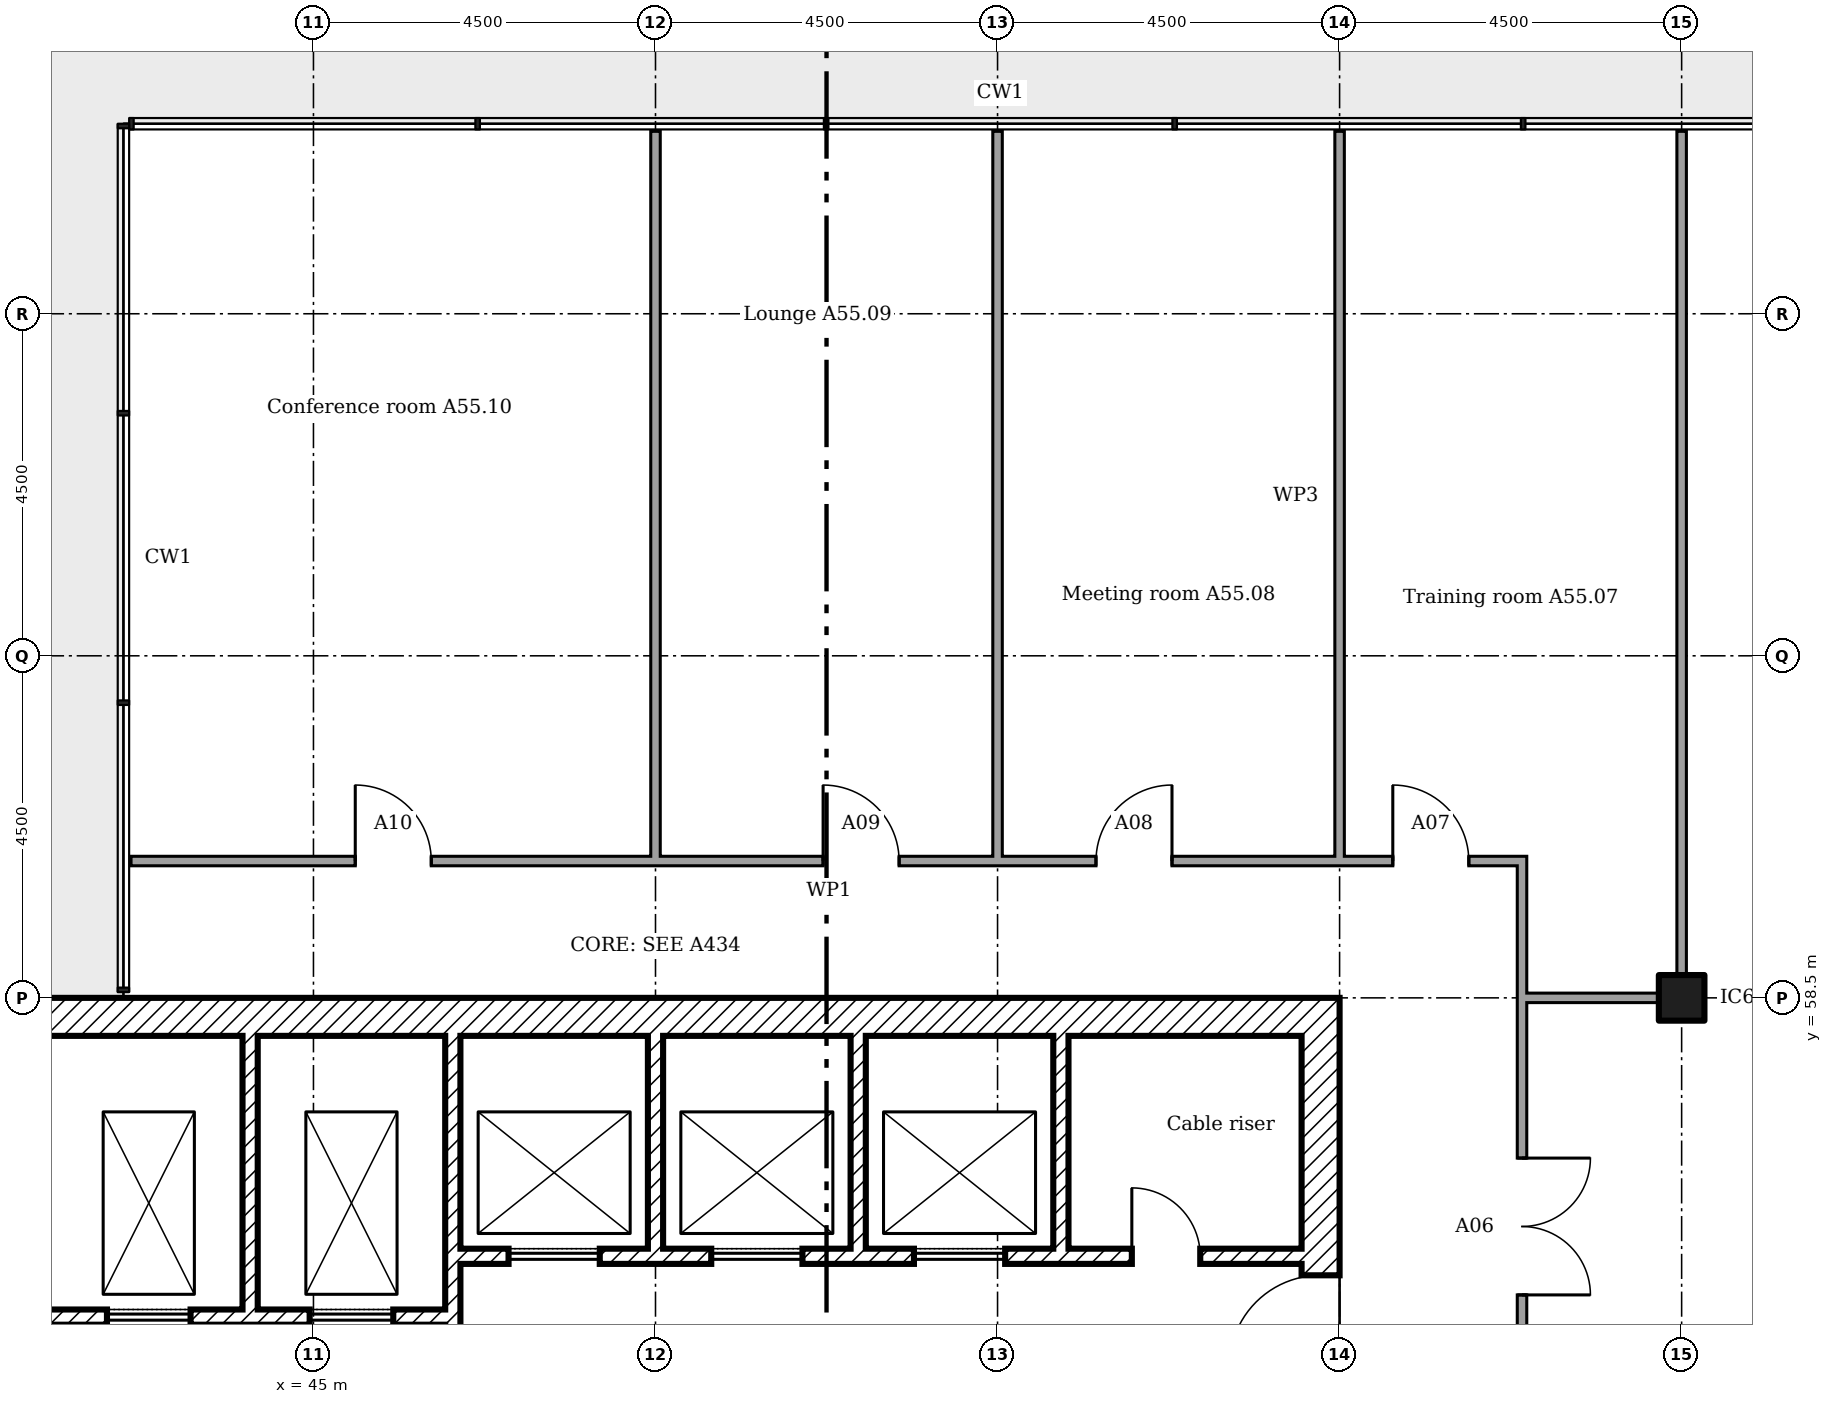
"""IFC4 building model, lengths in metres.
Left out: names, types, materials, properties, quantities, classifications, styles, units other than length and angle.
Written with IfcOpenShell. Run it as: python <this file> out.ifc"""

import sys

from ifc_helpers import new_model, si_unit, direction, frame, frame_2d, origin, origin_2d, place, context, subcontext, project, spatial, rectangle, extrude, element, fill, save


model = new_model("IFC4")
c1 = context("Model", 3, precision=1e-05, world=origin(), true_north=direction((0.0, 1.0)))
c2 = subcontext(c1, "Body", "Model", "MODEL_VIEW")
j1 = project(units=[si_unit("LENGTHUNIT", "METRE"), si_unit("PLANEANGLEUNIT", "RADIAN")], contexts=[c1])
p1 = place(None, origin())
s1 = spatial("IfcSite", under=j1, at=p1, CompositionType="ELEMENT")
p2 = place(p1, origin())
s2 = spatial("IfcBuilding", under=s1, at=p2, CompositionType="ELEMENT")
p3 = place(p2, frame((0.0, 0.0, 217.2)))
s3 = spatial("IfcBuildingStorey", under=s2, at=p3, CompositionType="ELEMENT", Elevation=217.2)
p4 = place(p3, frame((63.0, 58.5, 0.0)))
e1 = element("IfcColumn", 1, at=p4, inside=s3, PredefinedType="COLUMN", context=c2, shape_type="SweptSolid", body=[
    extrude(rectangle(XDim=0.6, YDim=0.6, at=origin_2d()), origin(), (0.0, 0.0, 1.0), 3.6),
])
p5 = place(p3, frame((58.25, 40.5, 0.0), z_axis=(0.0, 0.0, 1.0), x_axis=(0.0, 1.0, 0.0)))
e2 = element("IfcWall", 2, at=p5, inside=s3, PredefinedType="SHEAR", context=c2, shape_type="SweptSolid", body=[
    extrude(rectangle(XDim=18.0, YDim=0.5, at=frame_2d((9.0, 0.0))), origin(), (0.0, 0.0, 1.0), 3.35),
])
p6 = place(p5, frame((13.15, 0.0, 0.0)))
e3 = element("IfcOpeningElement", 3, at=p6, cuts=e2, PredefinedType="OPENING", context=c2, shape_type="SweptSolid", body=[
    extrude(rectangle(XDim=1.2, YDim=2.1, at=frame_2d((0.6, 1.05))), frame((0.0, 0.26, 0.0), z_axis=(0.0, -1.0, 0.0), x_axis=(1.0, 0.0, 0.0)), (0.0, 0.0, 1.0), 0.52),
])
p7 = place(p5, frame((3.9, 0.0, 0.0)))
e4 = element("IfcOpeningElement", 4, at=p7, cuts=e2, PredefinedType="OPENING", context=c2, shape_type="SweptSolid", body=[
    extrude(rectangle(XDim=1.8, YDim=2.1, at=frame_2d((0.9, 1.05))), frame((0.0, 0.26, 0.0), z_axis=(0.0, -1.0, 0.0), x_axis=(1.0, 0.0, 0.0)), (0.0, 0.0, 1.0), 0.52),
])
p8 = place(p5, frame((11.525, 0.0, 0.0)))
e5 = element("IfcOpeningElement", 5, at=p8, cuts=e2, PredefinedType="OPENING", context=c2, shape_type="SweptSolid", body=[
    extrude(rectangle(XDim=1.0, YDim=2.1, at=frame_2d((0.5, 1.05))), frame((0.0, 0.26, 0.0), z_axis=(0.0, -1.0, 0.0), x_axis=(1.0, 0.0, 0.0)), (0.0, 0.0, 1.0), 0.52),
])
p9 = place(p3, frame((40.5, 58.25, 0.0)))
e6 = element("IfcWall", 6, at=p9, inside=s3, PredefinedType="SHEAR", context=c2, shape_type="SweptSolid", body=[
    extrude(rectangle(XDim=17.5, YDim=0.5, at=frame_2d((8.75, 0.0))), origin(), (0.0, 0.0, 1.0), 3.35),
])
p10 = place(p3, frame((44.167, 58.0, 0.0), z_axis=(0.0, 0.0, 1.0), x_axis=(0.0, -1.0, 0.0)))
e7 = element("IfcWall", 7, at=p10, inside=s3, PredefinedType="SHEAR", context=c2, shape_type="SweptSolid", body=[
    extrude(rectangle(XDim=3.6, YDim=0.2, at=frame_2d((1.8, 0.0))), origin(), (0.0, 0.0, 1.0), 3.35),
])
p11 = place(p3, frame((46.833, 58.0, 0.0), z_axis=(0.0, 0.0, 1.0), x_axis=(0.0, -1.0, 0.0)))
e8 = element("IfcWall", 8, at=p11, inside=s3, PredefinedType="SHEAR", context=c2, shape_type="SweptSolid", body=[
    extrude(rectangle(XDim=4.7, YDim=0.2, at=frame_2d((2.35, 0.0))), origin(), (0.0, 0.0, 1.0), 3.35),
])
for number, where, z_axis, x_axis in (
    (9, (49.5, 58.0, 0.0), (0.0, 0.0, 1.0), (0.0, -1.0, 0.0)),
    (10, (52.167, 58.0, 0.0), (0.0, 0.0, 1.0), (0.0, -1.0, 0.0)),
    (11, (54.833, 58.0, 0.0), (0.0, 0.0, 1.0), (0.0, -1.0, 0.0)),
):
    element("IfcWall", number, at=place(p3, frame(where, z_axis=z_axis, x_axis=x_axis)), inside=s3, PredefinedType="SHEAR", context=c2, shape_type="SweptSolid", body=[
        extrude(rectangle(XDim=2.8, YDim=0.2, at=frame_2d((1.4, 0.0))), origin(), (0.0, 0.0, 1.0), 3.35),
    ])
p12 = place(p3, frame((46.933, 55.1, 0.0)))
e12 = element("IfcWall", 12, at=p12, inside=s3, PredefinedType="SHEAR", context=c2, shape_type="SweptSolid", body=[
    extrude(rectangle(XDim=11.067, YDim=0.2, at=frame_2d((5.533, 0.0))), origin(), (0.0, 0.0, 1.0), 3.35),
])
p13 = place(p12, frame((8.833, 0.0, 0.0)))
e13 = element("IfcOpeningElement", 13, at=p13, cuts=e12, PredefinedType="OPENING", context=c2, shape_type="SweptSolid", body=[
    extrude(rectangle(XDim=0.9, YDim=2.1, at=frame_2d((0.45, 1.05))), frame((0.0, 0.11, 0.0), z_axis=(0.0, -1.0, 0.0), x_axis=(1.0, 0.0, 0.0)), (0.0, 0.0, 1.0), 0.22),
])
p14 = place(p12, frame((0.633, 0.0, 0.0)))
e14 = element("IfcOpeningElement", 14, at=p14, cuts=e12, PredefinedType="OPENING", context=c2, shape_type="SweptSolid", body=[
    extrude(rectangle(XDim=1.2, YDim=2.1, at=frame_2d((0.6, 1.05))), frame((0.0, 0.11, 0.0), z_axis=(0.0, -1.0, 0.0), x_axis=(1.0, 0.0, 0.0)), (0.0, 0.0, 1.0), 0.22),
])
p15 = place(p12, frame((3.3, 0.0, 0.0)))
e15 = element("IfcOpeningElement", 15, at=p15, cuts=e12, PredefinedType="OPENING", context=c2, shape_type="SweptSolid", body=[
    extrude(rectangle(XDim=1.2, YDim=2.1, at=frame_2d((0.6, 1.05))), frame((0.0, 0.11, 0.0), z_axis=(0.0, -1.0, 0.0), x_axis=(1.0, 0.0, 0.0)), (0.0, 0.0, 1.0), 0.22),
])
p16 = place(p12, frame((5.967, 0.0, 0.0)))
e16 = element("IfcOpeningElement", 16, at=p16, cuts=e12, PredefinedType="OPENING", context=c2, shape_type="SweptSolid", body=[
    extrude(rectangle(XDim=1.2, YDim=2.1, at=frame_2d((0.6, 1.05))), frame((0.0, 0.11, 0.0), z_axis=(0.0, -1.0, 0.0), x_axis=(1.0, 0.0, 0.0)), (0.0, 0.0, 1.0), 0.22),
])
p17 = place(p3, frame((41.0, 54.3, 0.0)))
e17 = element("IfcWall", 17, at=p17, inside=s3, PredefinedType="SHEAR", context=c2, shape_type="SweptSolid", body=[
    extrude(rectangle(XDim=5.733, YDim=0.2, at=frame_2d((2.867, 0.0))), origin(), (0.0, 0.0, 1.0), 3.35),
])
p18 = place(p17, frame((1.283, 0.0, 0.0)))
e18 = element("IfcOpeningElement", 18, at=p18, cuts=e17, PredefinedType="OPENING", context=c2, shape_type="SweptSolid", body=[
    extrude(rectangle(XDim=1.1, YDim=2.1, at=frame_2d((0.55, 1.05))), frame((0.0, 0.11, 0.0), z_axis=(0.0, -1.0, 0.0), x_axis=(1.0, 0.0, 0.0)), (0.0, 0.0, 1.0), 0.22),
])
p19 = place(p17, frame((3.95, 0.0, 0.0)))
e19 = element("IfcOpeningElement", 19, at=p19, cuts=e17, PredefinedType="OPENING", context=c2, shape_type="SweptSolid", body=[
    extrude(rectangle(XDim=1.1, YDim=2.1, at=frame_2d((0.55, 1.05))), frame((0.0, 0.11, 0.0), z_axis=(0.0, -1.0, 0.0), x_axis=(1.0, 0.0, 0.0)), (0.0, 0.0, 1.0), 0.22),
])
p20 = place(p3, frame((60.9, 58.5, 0.0)))
e20 = element("IfcWall", 20, at=p20, inside=s3, PredefinedType="PARTITIONING", context=c2, shape_type="SweptSolid", body=[
    extrude(rectangle(XDim=2.163, YDim=0.125, at=frame_2d((1.081, 0.0))), origin(), (0.0, 0.0, 1.0), 2.676),
])
p21 = place(p3, frame((42.6, 60.3, 0.0)))
e21 = element("IfcWall", 21, at=p21, inside=s3, PredefinedType="PARTITIONING", context=c2, shape_type="SweptSolid", body=[
    extrude(rectangle(XDim=18.362, YDim=0.125, at=frame_2d((9.181, 0.0))), origin(), (0.0, 0.0, 1.0), 3.45),
])
p22 = place(p21, frame((16.6, 0.0, 0.0)))
e22 = element("IfcOpeningElement", 22, at=p22, cuts=e21, PredefinedType="OPENING", context=c2, shape_type="SweptSolid", body=[
    extrude(rectangle(XDim=1.0, YDim=2.1, at=frame_2d((0.5, 1.05))), frame((0.0, 0.073, 0.0), z_axis=(0.0, -1.0, 0.0), x_axis=(1.0, 0.0, 0.0)), (0.0, 0.0, 1.0), 0.145),
])
p23 = place(p21, frame((12.695, 0.0, 0.0)))
e23 = element("IfcOpeningElement", 23, at=p23, cuts=e21, PredefinedType="OPENING", context=c2, shape_type="SweptSolid", body=[
    extrude(rectangle(XDim=1.0, YDim=2.1, at=frame_2d((0.5, 1.05))), frame((0.0, 0.073, 0.0), z_axis=(0.0, -1.0, 0.0), x_axis=(1.0, 0.0, 0.0)), (0.0, 0.0, 1.0), 0.145),
])
p24 = place(p21, frame((9.105, 0.0, 0.0)))
e24 = element("IfcOpeningElement", 24, at=p24, cuts=e21, PredefinedType="OPENING", context=c2, shape_type="SweptSolid", body=[
    extrude(rectangle(XDim=1.0, YDim=2.1, at=frame_2d((0.5, 1.05))), frame((0.0, 0.073, 0.0), z_axis=(0.0, -1.0, 0.0), x_axis=(1.0, 0.0, 0.0)), (0.0, 0.0, 1.0), 0.145),
])
p25 = place(p21, frame((2.95, 0.0, 0.0)))
e25 = element("IfcOpeningElement", 25, at=p25, cuts=e21, PredefinedType="OPENING", context=c2, shape_type="SweptSolid", body=[
    extrude(rectangle(XDim=1.0, YDim=2.1, at=frame_2d((0.5, 1.05))), frame((0.0, 0.073, 0.0), z_axis=(0.0, -1.0, 0.0), x_axis=(1.0, 0.0, 0.0)), (0.0, 0.0, 1.0), 0.145),
])
for number, where, z_axis, x_axis in (
    (26, (49.5, 60.3, 0.0), (0.0, 0.0, 1.0), (0.0, 1.0, 0.0)),
    (27, (54.0, 60.3, 0.0), (0.0, 0.0, 1.0), (0.0, 1.0, 0.0)),
):
    element("IfcWall", number, at=place(p3, frame(where, z_axis=z_axis, x_axis=x_axis)), inside=s3, PredefinedType="PARTITIONING", context=c2, shape_type="SweptSolid", body=[
        extrude(rectangle(XDim=9.6, YDim=0.125, at=frame_2d((4.8, 0.0))), origin(), (0.0, 0.0, 1.0), 2.772),
    ])
p26 = place(p3, frame((58.5, 60.3, 0.0), z_axis=(0.0, 0.0, 1.0), x_axis=(0.0, 1.0, 0.0)))
e28 = element("IfcWall", 28, at=p26, inside=s3, PredefinedType="MOVABLE", context=c2, shape_type="SweptSolid", body=[
    extrude(rectangle(XDim=9.6, YDim=0.125, at=frame_2d((4.8, 0.0))), origin(), (0.0, 0.0, 1.0), 2.772),
])
p27 = place(p3, frame((60.9, 50.762, 0.0), z_axis=(0.0, 0.0, 1.0), x_axis=(0.0, 1.0, 0.0)))
e29 = element("IfcWall", 29, at=p27, inside=s3, PredefinedType="PARTITIONING", context=c2, shape_type="SweptSolid", body=[
    extrude(rectangle(XDim=9.475, YDim=0.125, at=frame_2d((4.738, 0.0))), origin(), (0.0, 0.0, 1.0), 3.45),
])
p28 = place(p27, frame((3.83, 0.0, 0.0)))
e30 = element("IfcOpeningElement", 30, at=p28, cuts=e29, PredefinedType="OPENING", context=c2, shape_type="SweptSolid", body=[
    extrude(rectangle(XDim=1.8, YDim=2.1, at=frame_2d((0.9, 1.05))), frame((0.0, 0.073, 0.0), z_axis=(0.0, -1.0, 0.0), x_axis=(1.0, 0.0, 0.0)), (0.0, 0.0, 1.0), 0.145),
])
p29 = place(p3, frame((63.0, 58.562, 0.0), z_axis=(0.0, 0.0, 1.0), x_axis=(0.0, 1.0, 0.0)))
e31 = element("IfcWall", 31, at=p29, inside=s3, PredefinedType="PARTITIONING", context=c2, shape_type="SweptSolid", body=[
    extrude(rectangle(XDim=11.337, YDim=0.125, at=frame_2d((5.669, 0.0))), origin(), (0.0, 0.0, 1.0), 2.772),
])
p30 = place(p6, origin())
e32 = element("IfcDoor", 32, at=p30, inside=s3, OperationType="SINGLE_SWING_RIGHT", PredefinedType="DOOR", context=c2, shape_type="SweptSolid", body=[
    extrude(rectangle(XDim=1.2, YDim=2.1, at=frame_2d((0.6, 1.05))), frame((0.0, 0.025, 0.0), z_axis=(0.0, -1.0, 0.0), x_axis=(1.0, 0.0, 0.0)), (0.0, 0.0, 1.0), 0.05),
])
fill(e3, e32)
p31 = place(p13, origin())
e33 = element("IfcDoor", 33, at=p31, inside=s3, OperationType="SINGLE_SWING_RIGHT", PredefinedType="DOOR", context=c2, shape_type="SweptSolid", body=[
    extrude(rectangle(XDim=0.9, YDim=2.1, at=frame_2d((0.45, 1.05))), frame((0.0, 0.025, 0.0), z_axis=(0.0, -1.0, 0.0), x_axis=(1.0, 0.0, 0.0)), (0.0, 0.0, 1.0), 0.05),
])
fill(e13, e33)
p32 = place(p18, origin())
e34 = element("IfcDoor", 34, at=p32, inside=s3, OperationType="SLIDING_TO_LEFT", PredefinedType="DOOR", context=c2, shape_type="SweptSolid", body=[
    extrude(rectangle(XDim=1.1, YDim=2.1, at=frame_2d((0.55, 1.05))), frame((0.0, 0.025, 0.0), z_axis=(0.0, -1.0, 0.0), x_axis=(1.0, 0.0, 0.0)), (0.0, 0.0, 1.0), 0.05),
])
fill(e18, e34)
p33 = place(p19, origin())
e35 = element("IfcDoor", 35, at=p33, inside=s3, OperationType="SLIDING_TO_LEFT", PredefinedType="DOOR", context=c2, shape_type="SweptSolid", body=[
    extrude(rectangle(XDim=1.1, YDim=2.1, at=frame_2d((0.55, 1.05))), frame((0.0, 0.025, 0.0), z_axis=(0.0, -1.0, 0.0), x_axis=(1.0, 0.0, 0.0)), (0.0, 0.0, 1.0), 0.05),
])
fill(e19, e35)
p34 = place(p14, origin())
e36 = element("IfcDoor", 36, at=p34, inside=s3, OperationType="SLIDING_TO_LEFT", PredefinedType="DOOR", context=c2, shape_type="SweptSolid", body=[
    extrude(rectangle(XDim=1.2, YDim=2.1, at=frame_2d((0.6, 1.05))), frame((0.0, 0.025, 0.0), z_axis=(0.0, -1.0, 0.0), x_axis=(1.0, 0.0, 0.0)), (0.0, 0.0, 1.0), 0.05),
])
fill(e14, e36)
p35 = place(p15, origin())
e37 = element("IfcDoor", 37, at=p35, inside=s3, OperationType="SLIDING_TO_LEFT", PredefinedType="DOOR", context=c2, shape_type="SweptSolid", body=[
    extrude(rectangle(XDim=1.2, YDim=2.1, at=frame_2d((0.6, 1.05))), frame((0.0, 0.025, 0.0), z_axis=(0.0, -1.0, 0.0), x_axis=(1.0, 0.0, 0.0)), (0.0, 0.0, 1.0), 0.05),
])
fill(e15, e37)
p36 = place(p16, origin())
e38 = element("IfcDoor", 38, at=p36, inside=s3, OperationType="SLIDING_TO_LEFT", PredefinedType="DOOR", context=c2, shape_type="SweptSolid", body=[
    extrude(rectangle(XDim=1.2, YDim=2.1, at=frame_2d((0.6, 1.05))), frame((0.0, 0.025, 0.0), z_axis=(0.0, -1.0, 0.0), x_axis=(1.0, 0.0, 0.0)), (0.0, 0.0, 1.0), 0.05),
])
fill(e16, e38)
p37 = place(p28, frame((1.8, 0.0, 0.0), x_axis=(-1.0, 0.0, 0.0)))
e39 = element("IfcDoor", 39, at=p37, inside=s3, OperationType="DOUBLE_DOOR_SINGLE_SWING", PredefinedType="DOOR", context=c2, shape_type="SweptSolid", body=[
    extrude(rectangle(XDim=1.8, YDim=2.1, at=frame_2d((0.9, 1.05))), frame((0.0, 0.025, 0.0), z_axis=(0.0, -1.0, 0.0), x_axis=(1.0, 0.0, 0.0)), (0.0, 0.0, 1.0), 0.05),
])
fill(e30, e39)
p38 = place(p22, origin())
e40 = element("IfcDoor", 40, at=p38, inside=s3, OperationType="SINGLE_SWING_RIGHT", PredefinedType="DOOR", context=c2, shape_type="SweptSolid", body=[
    extrude(rectangle(XDim=1.0, YDim=2.1, at=frame_2d((0.5, 1.05))), frame((0.0, 0.025, 0.0), z_axis=(0.0, -1.0, 0.0), x_axis=(1.0, 0.0, 0.0)), (0.0, 0.0, 1.0), 0.05),
])
fill(e22, e40)
p39 = place(p23, origin())
e41 = element("IfcDoor", 41, at=p39, inside=s3, OperationType="SINGLE_SWING_LEFT", PredefinedType="DOOR", context=c2, shape_type="SweptSolid", body=[
    extrude(rectangle(XDim=1.0, YDim=2.1, at=frame_2d((0.5, 1.05))), frame((0.0, 0.025, 0.0), z_axis=(0.0, -1.0, 0.0), x_axis=(1.0, 0.0, 0.0)), (0.0, 0.0, 1.0), 0.05),
])
fill(e23, e41)
p40 = place(p24, origin())
e42 = element("IfcDoor", 42, at=p40, inside=s3, OperationType="SINGLE_SWING_RIGHT", PredefinedType="DOOR", context=c2, shape_type="SweptSolid", body=[
    extrude(rectangle(XDim=1.0, YDim=2.1, at=frame_2d((0.5, 1.05))), frame((0.0, 0.025, 0.0), z_axis=(0.0, -1.0, 0.0), x_axis=(1.0, 0.0, 0.0)), (0.0, 0.0, 1.0), 0.05),
])
fill(e24, e42)
p41 = place(p25, origin())
e43 = element("IfcDoor", 43, at=p41, inside=s3, OperationType="SINGLE_SWING_RIGHT", PredefinedType="DOOR", context=c2, shape_type="SweptSolid", body=[
    extrude(rectangle(XDim=1.0, YDim=2.1, at=frame_2d((0.5, 1.05))), frame((0.0, 0.025, 0.0), z_axis=(0.0, -1.0, 0.0), x_axis=(1.0, 0.0, 0.0)), (0.0, 0.0, 1.0), 0.05),
])
fill(e25, e43)
save(model, sys.argv[1])
